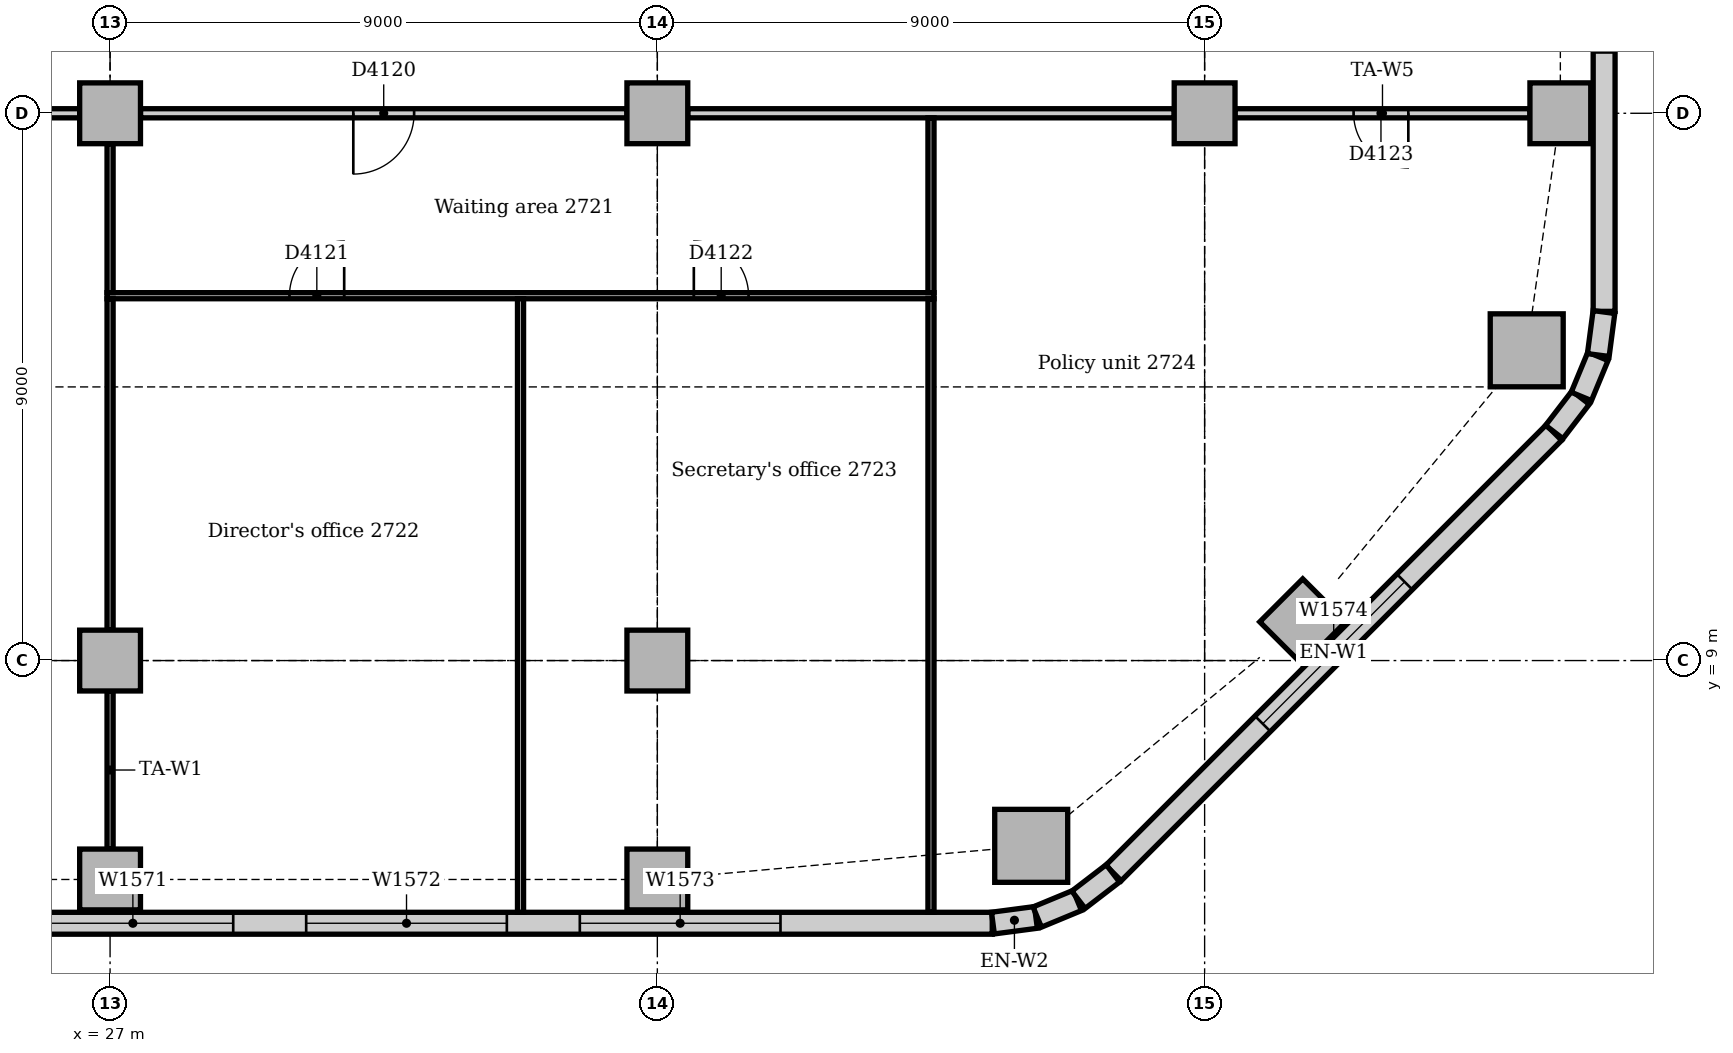
"""IFC4 building model, lengths in metres.
Left out: names, types, materials, properties, quantities, classifications, styles, units other than length and angle.
Written with IfcOpenShell. Run it as: python <this file> out.ifc"""

import sys

from ifc_helpers import new_model, si_unit, direction, frame, frame_2d, origin, origin_2d, place, context, subcontext, project, spatial, rectangle, extrude, element, fill, save


model = new_model("IFC4")
c1 = context("Model", 3, precision=1e-05, world=origin(), true_north=direction((0.0, 1.0)))
c2 = subcontext(c1, "Body", "Model", "MODEL_VIEW")
j1 = project(units=[si_unit("LENGTHUNIT", "METRE"), si_unit("PLANEANGLEUNIT", "RADIAN")], contexts=[c1])
p1 = place(None, origin())
s1 = spatial("IfcSite", under=j1, at=p1, CompositionType="ELEMENT")
p2 = place(p1, origin())
s2 = spatial("IfcBuilding", under=s1, at=p2, CompositionType="ELEMENT")
p3 = place(p2, frame((0.0, 0.0, 116.0)))
s3 = spatial("IfcBuildingStorey", under=s2, at=p3, CompositionType="ELEMENT", Elevation=116.0)
for number, where, z_axis, x_axis in (
    (1, (42.148, 5.953, 0.0), (0.0, 0.0, 1.0), (1.0, 0.0, 0.0)),
    (2, (50.297, 14.102, 0.0), (0.0, 0.0, 1.0), (1.0, 0.0, 0.0)),
):
    element("IfcColumn", number, at=place(p3, frame(where, z_axis=z_axis, x_axis=x_axis)), inside=s3, PredefinedType="COLUMN", context=c2, shape_type="SweptSolid", body=[
        extrude(rectangle(XDim=1.2, YDim=1.2, at=origin_2d()), origin(), (0.0, 0.0, 1.0), 3.85),
    ])
for number, where, z_axis, x_axis in (
    (3, (27.0, 5.4, 0.0), (0.0, 0.0, 1.0), (1.0, 0.0, 0.0)),
    (4, (36.0, 5.4, 0.0), (0.0, 0.0, 1.0), (1.0, 0.0, 0.0)),
    (5, (46.614, 9.636, 0.0), (0.0, 0.0, 1.0), (0.707, 0.707, 0.0)),
    (6, (50.85, 18.0, 0.0), (0.0, 0.0, 1.0), (1.0, 0.0, 0.0)),
    (7, (27.0, 9.0, 0.0), (0.0, 0.0, 1.0), (1.0, 0.0, 0.0)),
    (8, (27.0, 18.0, 0.0), (0.0, 0.0, 1.0), (1.0, 0.0, 0.0)),
    (9, (36.0, 9.0, 0.0), (0.0, 0.0, 1.0), (1.0, 0.0, 0.0)),
    (10, (36.0, 18.0, 0.0), (0.0, 0.0, 1.0), (1.0, 0.0, 0.0)),
    (11, (45.0, 18.0, 0.0), (0.0, 0.0, 1.0), (1.0, 0.0, 0.0)),
):
    element("IfcColumn", number, at=place(p3, frame(where, z_axis=z_axis, x_axis=x_axis)), inside=s3, PredefinedType="COLUMN", context=c2, shape_type="SweptSolid", body=[
        extrude(rectangle(XDim=1.0, YDim=1.0, at=origin_2d()), origin(), (0.0, 0.0, 1.0), 3.85),
    ])
p4 = place(p3, frame((4.243, 4.68, 0.0), z_axis=(0.0, 0.0, 1.0), x_axis=(1.0, 0.0, 0.0)))
e12 = element("IfcWall", 12, at=p4, inside=s3, PredefinedType="STANDARD", context=c2, shape_type="SweptSolid", body=[
    extrude(rectangle(XDim=37.265, YDim=0.36, at=frame_2d((18.632, 0.0))), origin(), (0.0, 0.0, 1.0), 3.85),
])
p5 = place(p4, frame((3.482, 0.0, 0.9)))
e13 = element("IfcOpeningElement", 13, at=p5, cuts=e12, PredefinedType="OPENING", context=c2, shape_type="SweptSolid", body=[
    extrude(rectangle(XDim=3.3, YDim=1.6, at=frame_2d((1.65, 0.8))), frame((0.0, 0.19, 0.0), z_axis=(0.0, -1.0, 0.0), x_axis=(1.0, 0.0, 0.0)), (0.0, 0.0, 1.0), 0.38),
])
p6 = place(p4, frame((7.982, 0.0, 0.9)))
e14 = element("IfcOpeningElement", 14, at=p6, cuts=e12, PredefinedType="OPENING", context=c2, shape_type="SweptSolid", body=[
    extrude(rectangle(XDim=3.3, YDim=1.6, at=frame_2d((1.65, 0.8))), frame((0.0, 0.19, 0.0), z_axis=(0.0, -1.0, 0.0), x_axis=(1.0, 0.0, 0.0)), (0.0, 0.0, 1.0), 0.38),
])
p7 = place(p4, frame((12.482, 0.0, 0.9)))
e15 = element("IfcOpeningElement", 15, at=p7, cuts=e12, PredefinedType="OPENING", context=c2, shape_type="SweptSolid", body=[
    extrude(rectangle(XDim=3.3, YDim=1.6, at=frame_2d((1.65, 0.8))), frame((0.0, 0.19, 0.0), z_axis=(0.0, -1.0, 0.0), x_axis=(1.0, 0.0, 0.0)), (0.0, 0.0, 1.0), 0.38),
])
p8 = place(p4, frame((16.982, 0.0, 0.9)))
e16 = element("IfcOpeningElement", 16, at=p8, cuts=e12, PredefinedType="OPENING", context=c2, shape_type="SweptSolid", body=[
    extrude(rectangle(XDim=3.3, YDim=1.6, at=frame_2d((1.65, 0.8))), frame((0.0, 0.19, 0.0), z_axis=(0.0, -1.0, 0.0), x_axis=(1.0, 0.0, 0.0)), (0.0, 0.0, 1.0), 0.38),
])
p9 = place(p4, frame((21.482, 0.0, 0.9)))
e17 = element("IfcOpeningElement", 17, at=p9, cuts=e12, PredefinedType="OPENING", context=c2, shape_type="SweptSolid", body=[
    extrude(rectangle(XDim=3.3, YDim=1.6, at=frame_2d((1.65, 0.8))), frame((0.0, 0.19, 0.0), z_axis=(0.0, -1.0, 0.0), x_axis=(1.0, 0.0, 0.0)), (0.0, 0.0, 1.0), 0.38),
])
p10 = place(p4, frame((25.982, 0.0, 0.9)))
e18 = element("IfcOpeningElement", 18, at=p10, cuts=e12, PredefinedType="OPENING", context=c2, shape_type="SweptSolid", body=[
    extrude(rectangle(XDim=3.3, YDim=1.6, at=frame_2d((1.65, 0.8))), frame((0.0, 0.19, 0.0), z_axis=(0.0, -1.0, 0.0), x_axis=(1.0, 0.0, 0.0)), (0.0, 0.0, 1.0), 0.38),
])
p11 = place(p4, frame((30.482, 0.0, 0.9)))
e19 = element("IfcOpeningElement", 19, at=p11, cuts=e12, PredefinedType="OPENING", context=c2, shape_type="SweptSolid", body=[
    extrude(rectangle(XDim=3.3, YDim=1.6, at=frame_2d((1.65, 0.8))), frame((0.0, 0.19, 0.0), z_axis=(0.0, -1.0, 0.0), x_axis=(1.0, 0.0, 0.0)), (0.0, 0.0, 1.0), 0.38),
])
p12 = place(p3, frame((43.501, 5.506, 0.0), z_axis=(0.0, 0.0, 1.0), x_axis=(0.707106781187, 0.707106781187, 0.0)))
e20 = element("IfcWall", 20, at=p12, inside=s3, PredefinedType="STANDARD", context=c2, shape_type="SweptSolid", body=[
    extrude(rectangle(XDim=10.243, YDim=0.36, at=frame_2d((5.121, 0.0))), origin(), (0.0, 0.0, 1.0), 3.85),
])
p13 = place(p12, frame((3.471, 0.0, 0.9)))
e21 = element("IfcOpeningElement", 21, at=p13, cuts=e20, PredefinedType="OPENING", context=c2, shape_type="SweptSolid", body=[
    extrude(rectangle(XDim=3.3, YDim=1.6, at=frame_2d((1.65, 0.8))), frame((0.0, 0.19, 0.0), z_axis=(0.0, -1.0, 0.0), x_axis=(1.0, 0.0, 0.0)), (0.0, 0.0, 1.0), 0.38),
])
p14 = place(p3, frame((51.57, 14.743, 0.0), z_axis=(0.0, 0.0, 1.0), x_axis=(0.0, 1.0, 0.0)))
e22 = element("IfcWall", 22, at=p14, inside=s3, PredefinedType="STANDARD", context=c2, shape_type="SweptSolid", body=[
    extrude(rectangle(XDim=24.515, YDim=0.36, at=frame_2d((12.257, 0.0))), origin(), (0.0, 0.0, 1.0), 3.85),
])
p15 = place(p14, frame((4.257, 0.0, 0.9)))
e23 = element("IfcOpeningElement", 23, at=p15, cuts=e22, PredefinedType="OPENING", context=c2, shape_type="SweptSolid", body=[
    extrude(rectangle(XDim=1.8, YDim=1.6, at=frame_2d((0.9, 0.8))), frame((0.0, 0.19, 0.0), z_axis=(0.0, -1.0, 0.0), x_axis=(1.0, 0.0, 0.0)), (0.0, 0.0, 1.0), 0.38),
])
p16 = place(p14, frame((8.357, 0.0, 0.9)))
e24 = element("IfcOpeningElement", 24, at=p16, cuts=e22, PredefinedType="OPENING", context=c2, shape_type="SweptSolid", body=[
    extrude(rectangle(XDim=3.3, YDim=1.6, at=frame_2d((1.65, 0.8))), frame((0.0, 0.19, 0.0), z_axis=(0.0, -1.0, 0.0), x_axis=(1.0, 0.0, 0.0)), (0.0, 0.0, 1.0), 0.38),
])
p17 = place(p14, frame((12.857, 0.0, 0.9)))
e25 = element("IfcOpeningElement", 25, at=p17, cuts=e22, PredefinedType="OPENING", context=c2, shape_type="SweptSolid", body=[
    extrude(rectangle(XDim=3.3, YDim=1.6, at=frame_2d((1.65, 0.8))), frame((0.0, 0.19, 0.0), z_axis=(0.0, -1.0, 0.0), x_axis=(1.0, 0.0, 0.0)), (0.0, 0.0, 1.0), 0.38),
])
p18 = place(p14, frame((17.357, 0.0, 0.9)))
e26 = element("IfcOpeningElement", 26, at=p18, cuts=e22, PredefinedType="OPENING", context=c2, shape_type="SweptSolid", body=[
    extrude(rectangle(XDim=3.3, YDim=1.6, at=frame_2d((1.65, 0.8))), frame((0.0, 0.19, 0.0), z_axis=(0.0, -1.0, 0.0), x_axis=(1.0, 0.0, 0.0)), (0.0, 0.0, 1.0), 0.38),
])
for number, where, z_axis, x_axis in (
    (27, (41.519, 4.683, 0.0), (0.0, 0.0, 1.0), (0.991, 0.131, 0.0)),
    (28, (42.247, 4.782, 0.0), (0.0, 0.0, 1.0), (0.924, 0.383, 0.0)),
):
    element("IfcWall", number, at=place(p3, frame(where, z_axis=z_axis, x_axis=x_axis)), inside=s3, PredefinedType="STANDARD", context=c2, shape_type="SweptSolid", body=[
        extrude(rectangle(XDim=0.713, YDim=0.36, at=frame_2d((0.356, 0.0))), origin(), (0.0, 0.0, 1.0), 3.85),
    ])
for number, where, z_axis, x_axis in (
    (29, (42.925, 5.066, 0.0), (0.0, 0.0, 1.0), (0.793, 0.609, 0.0)),
    (30, (50.75, 12.759, 0.0), (0.0, 0.0, 1.0), (0.609, 0.793, 0.0)),
):
    element("IfcWall", number, at=place(p3, frame(where, z_axis=z_axis, x_axis=x_axis)), inside=s3, PredefinedType="STANDARD", context=c2, shape_type="SweptSolid", body=[
        extrude(rectangle(XDim=0.713, YDim=0.36, at=frame_2d((0.357, 0.0))), origin(), (0.0, 0.0, 1.0), 3.85),
    ])
for number, where, z_axis, x_axis in (
    (31, (51.195, 13.344, 0.0), (0.0, 0.0, 1.0), (0.383, 0.924, 0.0)),
    (32, (51.474, 14.024, 0.0), (0.0, 0.0, 1.0), (0.131, 0.991, 0.0)),
):
    element("IfcWall", number, at=place(p3, frame(where, z_axis=z_axis, x_axis=x_axis)), inside=s3, PredefinedType="STANDARD", context=c2, shape_type="SweptSolid", body=[
        extrude(rectangle(XDim=0.713, YDim=0.36, at=frame_2d((0.356, 0.0))), origin(), (0.0, 0.0, 1.0), 3.85),
    ])
p19 = place(p3, frame((45.5, 18.0, 0.0), z_axis=(0.0, 0.0, 1.0), x_axis=(1.0, 0.0, 0.0)))
e33 = element("IfcWall", 33, at=p19, inside=s3, PredefinedType="PARTITIONING", context=c2, shape_type="SweptSolid", body=[
    extrude(rectangle(XDim=4.85, YDim=0.15, at=frame_2d((2.425, 0.0))), origin(), (0.0, 0.0, 1.0), 3.254),
])
p20 = place(p19, frame((1.95, 0.0, 0.0)))
e34 = element("IfcOpeningElement", 34, at=p20, cuts=e33, PredefinedType="OPENING", context=c2, shape_type="SweptSolid", body=[
    extrude(rectangle(XDim=0.9, YDim=2.1, at=frame_2d((0.45, 1.05))), frame((0.0, 0.085, 0.0), z_axis=(0.0, -1.0, 0.0), x_axis=(1.0, 0.0, 0.0)), (0.0, 0.0, 1.0), 0.17),
])
p21 = place(p3, frame((36.5, 18.0, 0.0), z_axis=(0.0, 0.0, 1.0), x_axis=(1.0, 0.0, 0.0)))
e35 = element("IfcWall", 35, at=p21, inside=s3, PredefinedType="PARTITIONING", context=c2, shape_type="SweptSolid", body=[
    extrude(rectangle(XDim=8.0, YDim=0.15, at=frame_2d((4.0, 0.0))), origin(), (0.0, 0.0, 1.0), 3.158),
])
p22 = place(p3, frame((27.5, 18.0, 0.0), z_axis=(0.0, 0.0, 1.0), x_axis=(1.0, 0.0, 0.0)))
e36 = element("IfcWall", 36, at=p22, inside=s3, PredefinedType="PARTITIONING", context=c2, shape_type="SweptSolid", body=[
    extrude(rectangle(XDim=8.0, YDim=0.15, at=frame_2d((4.0, 0.0))), origin(), (0.0, 0.0, 1.0), 3.158),
])
p23 = place(p22, frame((3.5, 0.0, 0.0)))
e37 = element("IfcOpeningElement", 37, at=p23, cuts=e36, PredefinedType="OPENING", context=c2, shape_type="SweptSolid", body=[
    extrude(rectangle(XDim=1.0, YDim=2.1, at=frame_2d((0.5, 1.05))), frame((0.0, 0.085, 0.0), z_axis=(0.0, -1.0, 0.0), x_axis=(1.0, 0.0, 0.0)), (0.0, 0.0, 1.0), 0.17),
])
p24 = place(p3, frame((18.5, 18.0, 0.0), z_axis=(0.0, 0.0, 1.0), x_axis=(1.0, 0.0, 0.0)))
e38 = element("IfcWall", 38, at=p24, inside=s3, PredefinedType="PARTITIONING", context=c2, shape_type="SweptSolid", body=[
    extrude(rectangle(XDim=8.0, YDim=0.15, at=frame_2d((4.0, 0.0))), origin(), (0.0, 0.0, 1.0), 3.158),
])
p25 = place(p24, frame((3.55, 0.0, 0.0)))
e39 = element("IfcOpeningElement", 39, at=p25, cuts=e38, PredefinedType="OPENING", context=c2, shape_type="SweptSolid", body=[
    extrude(rectangle(XDim=0.9, YDim=2.1, at=frame_2d((0.45, 1.05))), frame((0.0, 0.085, 0.0), z_axis=(0.0, -1.0, 0.0), x_axis=(1.0, 0.0, 0.0)), (0.0, 0.0, 1.0), 0.17),
])
p26 = place(p3, frame((26.95, 15.0, 0.0), z_axis=(0.0, 0.0, 1.0), x_axis=(1.0, 0.0, 0.0)))
e40 = element("IfcWall", 40, at=p26, inside=s3, PredefinedType="PARTITIONING", context=c2, shape_type="SweptSolid", body=[
    extrude(rectangle(XDim=13.6, YDim=0.1, at=frame_2d((6.8, 0.0))), origin(), (0.0, 0.0, 1.0), 3.85),
])
p27 = place(p26, frame((3.0, 0.0, 0.0)))
e41 = element("IfcOpeningElement", 41, at=p27, cuts=e40, PredefinedType="OPENING", context=c2, shape_type="SweptSolid", body=[
    extrude(rectangle(XDim=0.9, YDim=2.1, at=frame_2d((0.45, 1.05))), frame((0.0, 0.06, 0.0), z_axis=(0.0, -1.0, 0.0), x_axis=(1.0, 0.0, 0.0)), (0.0, 0.0, 1.0), 0.12),
])
p28 = place(p26, frame((9.65, 0.0, 0.0)))
e42 = element("IfcOpeningElement", 42, at=p28, cuts=e40, PredefinedType="OPENING", context=c2, shape_type="SweptSolid", body=[
    extrude(rectangle(XDim=0.9, YDim=2.1, at=frame_2d((0.45, 1.05))), frame((0.0, 0.06, 0.0), z_axis=(0.0, -1.0, 0.0), x_axis=(1.0, 0.0, 0.0)), (0.0, 0.0, 1.0), 0.12),
])
p29 = place(p3, frame((27.0, 5.9, 0.0), z_axis=(0.0, 0.0, 1.0), x_axis=(0.0, 1.0, 0.0)))
e43 = element("IfcWall", 43, at=p29, inside=s3, PredefinedType="PARTITIONING", context=c2, shape_type="SweptSolid", body=[
    extrude(rectangle(XDim=2.6, YDim=0.1, at=frame_2d((1.3, 0.0))), origin(), (0.0, 0.0, 1.0), 3.652),
])
p30 = place(p3, frame((27.0, 15.05, 0.0), z_axis=(0.0, 0.0, 1.0), x_axis=(0.0, 1.0, 0.0)))
e44 = element("IfcWall", 44, at=p30, inside=s3, PredefinedType="PARTITIONING", context=c2, shape_type="SweptSolid", body=[
    extrude(rectangle(XDim=2.45, YDim=0.1, at=frame_2d((1.225, 0.0))), origin(), (0.0, 0.0, 1.0), 3.256),
])
p31 = place(p3, frame((27.0, 9.5, 0.0), z_axis=(0.0, 0.0, 1.0), x_axis=(0.0, 1.0, 0.0)))
e45 = element("IfcWall", 45, at=p31, inside=s3, PredefinedType="PARTITIONING", context=c2, shape_type="SweptSolid", body=[
    extrude(rectangle(XDim=5.45, YDim=0.1, at=frame_2d((2.725, 0.0))), origin(), (0.0, 0.0, 1.0), 3.256),
])
p32 = place(p3, frame((40.5, 15.05, 0.0), z_axis=(0.0, 0.0, 1.0), x_axis=(0.0, 1.0, 0.0)))
e46 = element("IfcWall", 46, at=p32, inside=s3, PredefinedType="PARTITIONING", context=c2, shape_type="SweptSolid", body=[
    extrude(rectangle(XDim=2.875, YDim=0.1, at=frame_2d((1.438, 0.0))), origin(), (0.0, 0.0, 1.0), 3.85),
])
for number, where, z_axis, x_axis in (
    (47, (40.5, 4.86, 0.0), (0.0, 0.0, 1.0), (0.0, 1.0, 0.0)),
    (48, (33.75, 4.86, 0.0), (0.0, 0.0, 1.0), (0.0, 1.0, 0.0)),
):
    element("IfcWall", number, at=place(p3, frame(where, z_axis=z_axis, x_axis=x_axis)), inside=s3, PredefinedType="PARTITIONING", context=c2, shape_type="SweptSolid", body=[
        extrude(rectangle(XDim=10.09, YDim=0.1, at=frame_2d((5.045, 0.0))), origin(), (0.0, 0.0, 1.0), 3.85),
    ])
p33 = place(p9, origin())
e49 = element("IfcWindow", 49, at=p33, inside=s3, PartitioningType="SINGLE_PANEL", PredefinedType="WINDOW", context=c2, shape_type="SweptSolid", body=[
    extrude(rectangle(XDim=3.3, YDim=1.6, at=frame_2d((1.65, 0.8))), frame((0.0, 0.13, 0.0), z_axis=(0.0, -1.0, 0.0), x_axis=(1.0, 0.0, 0.0)), (0.0, 0.0, 1.0), 0.06),
])
fill(e17, e49)
p34 = place(p10, origin())
e50 = element("IfcWindow", 50, at=p34, inside=s3, PartitioningType="SINGLE_PANEL", PredefinedType="WINDOW", context=c2, shape_type="SweptSolid", body=[
    extrude(rectangle(XDim=3.3, YDim=1.6, at=frame_2d((1.65, 0.8))), frame((0.0, 0.13, 0.0), z_axis=(0.0, -1.0, 0.0), x_axis=(1.0, 0.0, 0.0)), (0.0, 0.0, 1.0), 0.06),
])
fill(e18, e50)
p35 = place(p11, origin())
e51 = element("IfcWindow", 51, at=p35, inside=s3, PartitioningType="SINGLE_PANEL", PredefinedType="WINDOW", context=c2, shape_type="SweptSolid", body=[
    extrude(rectangle(XDim=3.3, YDim=1.6, at=frame_2d((1.65, 0.8))), frame((0.0, 0.13, 0.0), z_axis=(0.0, -1.0, 0.0), x_axis=(1.0, 0.0, 0.0)), (0.0, 0.0, 1.0), 0.06),
])
fill(e19, e51)
p36 = place(p13, origin())
e52 = element("IfcWindow", 52, at=p36, inside=s3, PartitioningType="SINGLE_PANEL", PredefinedType="WINDOW", context=c2, shape_type="SweptSolid", body=[
    extrude(rectangle(XDim=3.3, YDim=1.6, at=frame_2d((1.65, 0.8))), frame((0.0, 0.13, 0.0), z_axis=(0.0, -1.0, 0.0), x_axis=(1.0, 0.0, 0.0)), (0.0, 0.0, 1.0), 0.06),
])
fill(e21, e52)
p37 = place(p23, frame((1.0, 0.0, 0.0), z_axis=(0.0, 0.0, 1.0), x_axis=(-1.0, 0.0, 0.0)))
e53 = element("IfcDoor", 53, at=p37, inside=s3, OperationType="SINGLE_SWING_RIGHT", PredefinedType="DOOR", context=c2, shape_type="SweptSolid", body=[
    extrude(rectangle(XDim=1.0, YDim=2.1, at=frame_2d((0.5, 1.05))), frame((0.0, 0.025, 0.0), z_axis=(0.0, -1.0, 0.0), x_axis=(1.0, 0.0, 0.0)), (0.0, 0.0, 1.0), 0.05),
])
fill(e37, e53)
p38 = place(p27, origin())
e54 = element("IfcDoor", 54, at=p38, inside=s3, OperationType="SINGLE_SWING_RIGHT", PredefinedType="DOOR", context=c2, shape_type="SweptSolid", body=[
    extrude(rectangle(XDim=0.9, YDim=2.1, at=frame_2d((0.45, 1.05))), frame((0.0, 0.025, 0.0), z_axis=(0.0, -1.0, 0.0), x_axis=(1.0, 0.0, 0.0)), (0.0, 0.0, 1.0), 0.05),
])
fill(e41, e54)
p39 = place(p28, origin())
e55 = element("IfcDoor", 55, at=p39, inside=s3, OperationType="SINGLE_SWING_LEFT", PredefinedType="DOOR", context=c2, shape_type="SweptSolid", body=[
    extrude(rectangle(XDim=0.9, YDim=2.1, at=frame_2d((0.45, 1.05))), frame((0.0, 0.025, 0.0), z_axis=(0.0, -1.0, 0.0), x_axis=(1.0, 0.0, 0.0)), (0.0, 0.0, 1.0), 0.05),
])
fill(e42, e55)
p40 = place(p20, frame((0.9, 0.0, 0.0), z_axis=(0.0, 0.0, 1.0), x_axis=(-1.0, 0.0, 0.0)))
e56 = element("IfcDoor", 56, at=p40, inside=s3, OperationType="SINGLE_SWING_LEFT", PredefinedType="DOOR", context=c2, shape_type="SweptSolid", body=[
    extrude(rectangle(XDim=0.9, YDim=2.1, at=frame_2d((0.45, 1.05))), frame((0.0, 0.025, 0.0), z_axis=(0.0, -1.0, 0.0), x_axis=(1.0, 0.0, 0.0)), (0.0, 0.0, 1.0), 0.05),
])
fill(e34, e56)
save(model, sys.argv[1])
